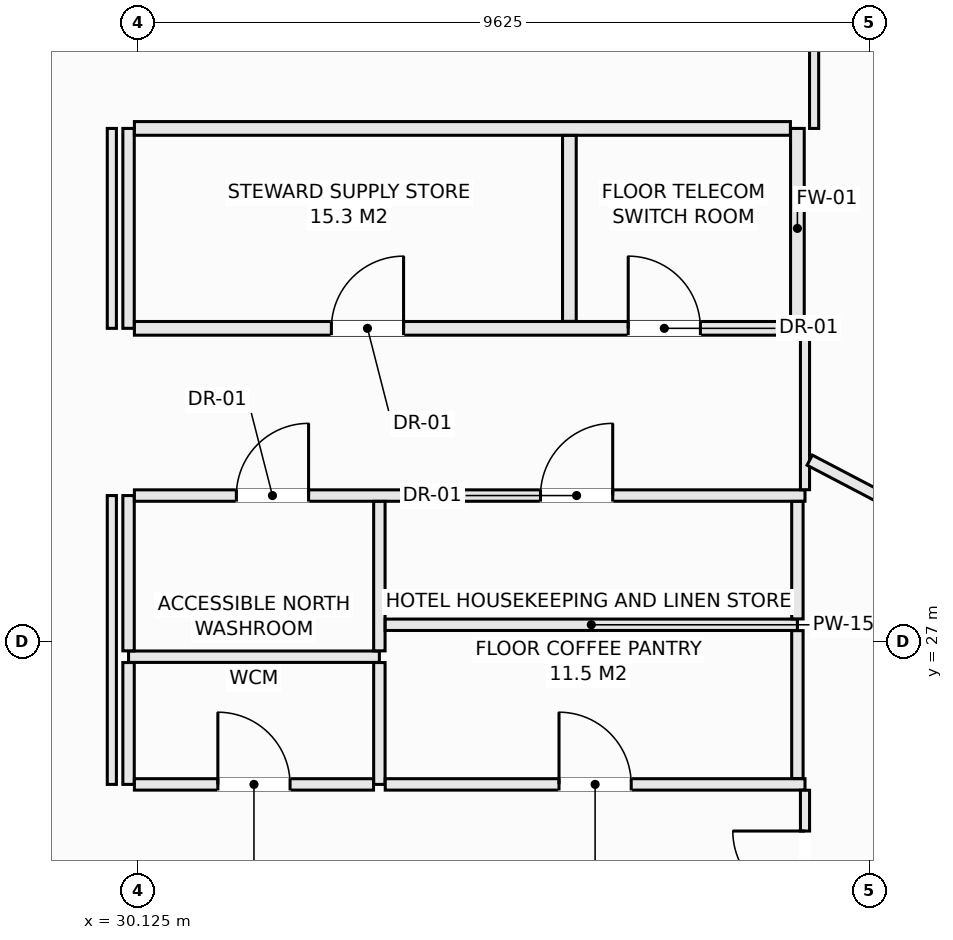
"""IFC4 building model, lengths in metres.
Left out: names, types, materials, properties, quantities, classifications, styles, units other than length and angle.
Written with IfcOpenShell. Run it as: python <this file> out.ifc"""

import sys

from ifc_helpers import new_model, si_unit, direction, frame, frame_2d, origin, place, context, subcontext, project, spatial, rectangle, extrude, element, fill, save


model = new_model("IFC4")
c1 = context("Model", 3, precision=1e-05, world=origin(), true_north=direction((0.0, 1.0)))
c2 = subcontext(c1, "Body", "Model", "MODEL_VIEW")
j1 = project(units=[si_unit("LENGTHUNIT", "METRE"), si_unit("PLANEANGLEUNIT", "RADIAN")], contexts=[c1])
p1 = place(None, origin())
s1 = spatial("IfcSite", under=j1, at=p1, CompositionType="ELEMENT")
p2 = place(p1, origin())
s2 = spatial("IfcBuilding", under=s1, at=p2, CompositionType="ELEMENT")
p3 = place(p2, frame((0.0, 0.0, 159.7)))
s3 = spatial("IfcBuildingStorey", under=s2, at=p3, CompositionType="ELEMENT", Elevation=159.7)
p4 = place(p3, frame((30.0, 26.8, 0.0), z_axis=(0.0, 0.0, 1.0), x_axis=(1.0, 0.0, 0.0)))
e1 = element("IfcWall", 1, at=p4, inside=s3, PredefinedType="PARTITIONING", context=c2, shape_type="SweptSolid", body=[
    extrude(rectangle(XDim=3.3, YDim=0.15, at=frame_2d((1.65, 0.0))), origin(), (0.0, 0.0, 1.0), 3.13),
])
p5 = place(p3, frame((30.0, 25.12, 0.0), z_axis=(0.0, 0.0, 1.0), x_axis=(0.0, 1.0, 0.0)))
e2 = element("IfcWall", 2, at=p5, inside=s3, PredefinedType="PARTITIONING", context=c2, shape_type="SweptSolid", body=[
    extrude(rectangle(XDim=1.603, YDim=0.15, at=frame_2d((0.801, 0.0))), origin(), (0.0, 0.0, 1.0), 3.13),
])
p6 = place(p3, frame((30.0, 26.877, 0.0), z_axis=(0.0, 0.0, 1.0), x_axis=(0.0, 1.0, 0.0)))
e3 = element("IfcWall", 3, at=p6, inside=s3, PredefinedType="PARTITIONING", context=c2, shape_type="SweptSolid", body=[
    extrude(rectangle(XDim=2.043, YDim=0.15, at=frame_2d((1.021, 0.0))), origin(), (0.0, 0.0, 1.0), 3.13),
])
p7 = place(p3, frame((30.0, 31.12, 0.0), z_axis=(0.0, 0.0, 1.0), x_axis=(0.0, 1.0, 0.0)))
e4 = element("IfcWall", 4, at=p7, inside=s3, PredefinedType="PARTITIONING", context=c2, shape_type="SweptSolid", body=[
    extrude(rectangle(XDim=2.63, YDim=0.15, at=frame_2d((1.315, 0.0))), origin(), (0.0, 0.0, 1.0), 3.13),
])
p8 = place(p3, frame((30.077, 28.92, 0.0), z_axis=(0.0, 0.0, 1.0), x_axis=(1.0, 0.0, 0.0)))
e5 = element("IfcWall", 5, at=p8, inside=s3, PredefinedType="PARTITIONING", context=c2, shape_type="SweptSolid", body=[
    extrude(rectangle(XDim=8.823, YDim=0.15, at=frame_2d((4.412, 0.0))), origin(), (0.0, 0.0, 1.0), 3.13),
])
p9 = place(p8, frame((1.342, 0.0, 0.0)))
e6 = element("IfcOpeningElement", 6, at=p9, cuts=e5, PredefinedType="OPENING", context=c2, shape_type="SweptSolid", body=[
    extrude(rectangle(XDim=0.95, YDim=2.1, at=frame_2d((0.475, 1.05))), frame((0.0, 0.085, 0.0), z_axis=(0.0, -1.0, 0.0), x_axis=(1.0, 0.0, 0.0)), (0.0, 0.0, 1.0), 0.17),
])
p10 = place(p8, frame((5.343, 0.0, 0.0)))
e7 = element("IfcOpeningElement", 7, at=p10, cuts=e5, PredefinedType="OPENING", context=c2, shape_type="SweptSolid", body=[
    extrude(rectangle(XDim=0.95, YDim=2.1, at=frame_2d((0.475, 1.05))), frame((0.0, 0.085, 0.0), z_axis=(0.0, -1.0, 0.0), x_axis=(1.0, 0.0, 0.0)), (0.0, 0.0, 1.0), 0.17),
])
p11 = place(p3, frame((33.3, 25.12, 0.0), z_axis=(0.0, 0.0, 1.0), x_axis=(0.0, 1.0, 0.0)))
e8 = element("IfcWall", 8, at=p11, inside=s3, PredefinedType="PARTITIONING", context=c2, shape_type="SweptSolid", body=[
    extrude(rectangle(XDim=1.603, YDim=0.15, at=frame_2d((0.801, 0.0))), origin(), (0.0, 0.0, 1.0), 3.13),
])
p12 = place(p3, frame((33.3, 26.877, 0.0), z_axis=(0.0, 0.0, 1.0), x_axis=(0.0, 1.0, 0.0)))
e9 = element("IfcWall", 9, at=p12, inside=s3, PredefinedType="PARTITIONING", context=c2, shape_type="SweptSolid", body=[
    extrude(rectangle(XDim=1.966, YDim=0.15, at=frame_2d((0.983, 0.0))), origin(), (0.0, 0.0, 1.0), 3.13),
])
p13 = place(p3, frame((30.077, 25.12, 0.0), z_axis=(0.0, 0.0, 1.0), x_axis=(1.0, 0.0, 0.0)))
e10 = element("IfcWall", 10, at=p13, inside=s3, PredefinedType="PARTITIONING", context=c2, shape_type="SweptSolid", body=[
    extrude(rectangle(XDim=3.146, YDim=0.15, at=frame_2d((1.573, 0.0))), origin(), (0.0, 0.0, 1.0), 3.13),
])
p14 = place(p13, frame((1.098, 0.0, 0.0)))
e11 = element("IfcOpeningElement", 11, at=p14, cuts=e10, PredefinedType="OPENING", context=c2, shape_type="SweptSolid", body=[
    extrude(rectangle(XDim=0.95, YDim=2.1, at=frame_2d((0.475, 1.05))), frame((0.0, 0.085, 0.0), z_axis=(0.0, -1.0, 0.0), x_axis=(1.0, 0.0, 0.0)), (0.0, 0.0, 1.0), 0.17),
])
p15 = place(p3, frame((33.377, 25.12, 0.0), z_axis=(0.0, 0.0, 1.0), x_axis=(1.0, 0.0, 0.0)))
e12 = element("IfcWall", 12, at=p15, inside=s3, PredefinedType="PARTITIONING", context=c2, shape_type="SweptSolid", body=[
    extrude(rectangle(XDim=5.523, YDim=0.15, at=frame_2d((2.761, 0.0))), origin(), (0.0, 0.0, 1.0), 3.13),
])
p16 = place(p15, frame((2.287, 0.0, 0.0)))
e13 = element("IfcOpeningElement", 13, at=p16, cuts=e12, PredefinedType="OPENING", context=c2, shape_type="SweptSolid", body=[
    extrude(rectangle(XDim=0.95, YDim=2.1, at=frame_2d((0.475, 1.05))), frame((0.0, 0.085, 0.0), z_axis=(0.0, -1.0, 0.0), x_axis=(1.0, 0.0, 0.0)), (0.0, 0.0, 1.0), 0.17),
])
p17 = place(p3, frame((33.377, 27.22, 0.0), z_axis=(0.0, 0.0, 1.0), x_axis=(1.0, 0.0, 0.0)))
e14 = element("IfcWall", 14, at=p17, inside=s3, PredefinedType="PARTITIONING", context=c2, shape_type="SweptSolid", body=[
    extrude(rectangle(XDim=5.423, YDim=0.15, at=frame_2d((2.711, 0.0))), origin(), (0.0, 0.0, 1.0), 3.13),
])
p18 = place(p3, frame((38.8, 25.197, 0.0), z_axis=(0.0, 0.0, 1.0), x_axis=(0.0, 1.0, 0.0)))
e15 = element("IfcWall", 15, at=p18, inside=s3, PredefinedType="PARTITIONING", context=c2, shape_type="SweptSolid", body=[
    extrude(rectangle(XDim=1.946, YDim=0.15, at=frame_2d((0.973, 0.0))), origin(), (0.0, 0.0, 1.0), 3.13),
])
p19 = place(p3, frame((38.8, 27.297, 0.0), z_axis=(0.0, 0.0, 1.0), x_axis=(0.0, 1.0, 0.0)))
e16 = element("IfcWall", 16, at=p19, inside=s3, PredefinedType="PARTITIONING", context=c2, shape_type="SweptSolid", body=[
    extrude(rectangle(XDim=1.546, YDim=0.15, at=frame_2d((0.773, 0.0))), origin(), (0.0, 0.0, 1.0), 3.13),
])
p20 = place(p3, frame((38.8, 31.12, 0.0), z_axis=(0.0, 0.0, 1.0), x_axis=(0.0, 1.0, 0.0)))
e17 = element("IfcWall", 17, at=p20, inside=s3, PredefinedType="SOLIDWALL", context=c2, shape_type="SweptSolid", body=[
    extrude(rectangle(XDim=2.63, YDim=0.18, at=frame_2d((1.315, 0.0))), origin(), (0.0, 0.0, 1.0), 3.13),
])
p21 = place(p3, frame((30.077, 31.12, 0.0), z_axis=(0.0, 0.0, 1.0), x_axis=(1.0, 0.0, 0.0)))
e18 = element("IfcWall", 18, at=p21, inside=s3, PredefinedType="SOLIDWALL", context=c2, shape_type="SweptSolid", body=[
    extrude(rectangle(XDim=8.631, YDim=0.18, at=frame_2d((4.315, 0.0))), origin(), (0.0, 0.0, 1.0), 3.13),
])
p22 = place(p21, frame((2.592, 0.0, 0.0)))
e19 = element("IfcOpeningElement", 19, at=p22, cuts=e18, PredefinedType="OPENING", context=c2, shape_type="SweptSolid", body=[
    extrude(rectangle(XDim=0.95, YDim=2.1, at=frame_2d((0.475, 1.05))), frame((0.0, 0.1, 0.0), z_axis=(0.0, -1.0, 0.0), x_axis=(1.0, 0.0, 0.0)), (0.0, 0.0, 1.0), 0.2),
])
p23 = place(p21, frame((6.497, 0.0, 0.0)))
e20 = element("IfcOpeningElement", 20, at=p23, cuts=e18, PredefinedType="OPENING", context=c2, shape_type="SweptSolid", body=[
    extrude(rectangle(XDim=0.95, YDim=2.1, at=frame_2d((0.475, 1.05))), frame((0.0, 0.1, 0.0), z_axis=(0.0, -1.0, 0.0), x_axis=(1.0, 0.0, 0.0)), (0.0, 0.0, 1.0), 0.2),
])
p24 = place(p3, frame((30.077, 33.75, 0.0), z_axis=(0.0, 0.0, 1.0), x_axis=(1.0, 0.0, 0.0)))
e21 = element("IfcWall", 21, at=p24, inside=s3, PredefinedType="SOLIDWALL", context=c2, shape_type="SweptSolid", body=[
    extrude(rectangle(XDim=8.631, YDim=0.18, at=frame_2d((4.315, 0.0))), origin(), (0.0, 0.0, 1.0), 3.13),
])
p25 = place(p3, frame((35.8, 31.212, 0.0), z_axis=(0.0, 0.0, 1.0), x_axis=(0.0, 1.0, 0.0)))
e22 = element("IfcWall", 22, at=p25, inside=s3, PredefinedType="SOLIDWALL", context=c2, shape_type="SweptSolid", body=[
    extrude(rectangle(XDim=2.446, YDim=0.18, at=frame_2d((1.223, 0.0))), origin(), (0.0, 0.0, 1.0), 3.13),
])
p26 = place(p3, frame((39.02, 33.75, 0.0), z_axis=(0.0, 0.0, 1.0), x_axis=(0.0, 1.0, 0.0)))
e23 = element("IfcWall", 23, at=p26, inside=s3, PredefinedType="PARTITIONING", context=c2, shape_type="SweptSolid", body=[
    extrude(rectangle(XDim=2.0, YDim=0.12, at=frame_2d((1.0, 0.0))), origin(), (0.0, 0.0, 1.0), 3.13),
])
p27 = place(p3, frame((29.78, 25.12, 0.0), z_axis=(0.0, 0.0, 1.0), x_axis=(0.0, 1.0, 0.0)))
e24 = element("IfcWall", 24, at=p27, inside=s3, PredefinedType="PARTITIONING", context=c2, shape_type="SweptSolid", body=[
    extrude(rectangle(XDim=3.8, YDim=0.12, at=frame_2d((1.9, 0.0))), origin(), (0.0, 0.0, 1.0), 3.13),
])
p28 = place(p3, frame((29.78, 31.12, 0.0), z_axis=(0.0, 0.0, 1.0), x_axis=(0.0, 1.0, 0.0)))
e25 = element("IfcWall", 25, at=p28, inside=s3, PredefinedType="PARTITIONING", context=c2, shape_type="SweptSolid", body=[
    extrude(rectangle(XDim=2.63, YDim=0.12, at=frame_2d((1.315, 0.0))), origin(), (0.0, 0.0, 1.0), 3.13),
])
p29 = place(p3, frame((38.9, 23.02, 0.0), z_axis=(0.0, 0.0, 1.0), x_axis=(0.0, 1.0, 0.0)))
e26 = element("IfcWall", 26, at=p29, inside=s3, PredefinedType="PARTITIONING", context=c2, shape_type="SweptSolid", body=[
    extrude(rectangle(XDim=2.023, YDim=0.12, at=frame_2d((1.011, 0.0))), origin(), (0.0, 0.0, 1.0), 3.13),
])
p30 = place(p29, frame((0.537, 0.0, 0.0)))
e27 = element("IfcOpeningElement", 27, at=p30, cuts=e26, PredefinedType="OPENING", context=c2, shape_type="SweptSolid", body=[
    extrude(rectangle(XDim=0.95, YDim=2.1, at=frame_2d((0.475, 1.05))), frame((0.0, 0.07, 0.0), z_axis=(0.0, -1.0, 0.0), x_axis=(1.0, 0.0, 0.0)), (0.0, 0.0, 1.0), 0.14),
])
p31 = place(p3, frame((38.9, 28.997, 0.0), z_axis=(0.0, 0.0, 1.0), x_axis=(0.0, 1.0, 0.0)))
e28 = element("IfcWall", 28, at=p31, inside=s3, PredefinedType="PARTITIONING", context=c2, shape_type="SweptSolid", body=[
    extrude(rectangle(XDim=2.123, YDim=0.12, at=frame_2d((1.062, 0.0))), origin(), (0.0, 0.0, 1.0), 3.13),
])
p32 = place(p3, frame((38.962, 29.386, 0.0), z_axis=(0.0, 0.0, 1.0), x_axis=(0.885905291329, -0.463866160434, 0.0)))
e29 = element("IfcWall", 29, at=p32, inside=s3, PredefinedType="PARTITIONING", context=c2, shape_type="SweptSolid", body=[
    extrude(rectangle(XDim=13.863, YDim=0.15, at=frame_2d((6.931, 0.0))), origin(), (0.0, 0.0, 1.0), 2.505),
])
p33 = place(p3, frame((39.021, 19.324, 0.0), z_axis=(0.0, 0.0, 1.0), x_axis=(0.724517158733, 0.689256763986, 0.0)))
e30 = element("IfcWall", 30, at=p33, inside=s3, PredefinedType="PARTITIONING", context=c2, shape_type="SweptSolid", body=[
    extrude(rectangle(XDim=9.306, YDim=0.12, at=frame_2d((4.653, 0.0))), origin(), (0.0, 0.0, 1.0), 2.505),
])
p34 = place(p9, origin())
e31 = element("IfcDoor", 31, at=p34, inside=s3, OperationType="SINGLE_SWING_RIGHT", PredefinedType="DOOR", context=c2, shape_type="SweptSolid", body=[
    extrude(rectangle(XDim=0.95, YDim=2.1, at=frame_2d((0.475, 1.05))), frame((0.0, 0.025, 0.0), z_axis=(0.0, -1.0, 0.0), x_axis=(1.0, 0.0, 0.0)), (0.0, 0.0, 1.0), 0.05),
])
fill(e6, e31)
p35 = place(p14, origin())
e32 = element("IfcDoor", 32, at=p35, inside=s3, OperationType="SINGLE_SWING_LEFT", PredefinedType="DOOR", context=c2, shape_type="SweptSolid", body=[
    extrude(rectangle(XDim=0.95, YDim=2.1, at=frame_2d((0.475, 1.05))), frame((0.0, 0.025, 0.0), z_axis=(0.0, -1.0, 0.0), x_axis=(1.0, 0.0, 0.0)), (0.0, 0.0, 1.0), 0.05),
])
fill(e11, e32)
p36 = place(p10, origin())
e33 = element("IfcDoor", 33, at=p36, inside=s3, OperationType="SINGLE_SWING_RIGHT", PredefinedType="DOOR", context=c2, shape_type="SweptSolid", body=[
    extrude(rectangle(XDim=0.95, YDim=2.1, at=frame_2d((0.475, 1.05))), frame((0.0, 0.025, 0.0), z_axis=(0.0, -1.0, 0.0), x_axis=(1.0, 0.0, 0.0)), (0.0, 0.0, 1.0), 0.05),
])
fill(e7, e33)
p37 = place(p16, origin())
e34 = element("IfcDoor", 34, at=p37, inside=s3, OperationType="SINGLE_SWING_LEFT", PredefinedType="DOOR", context=c2, shape_type="SweptSolid", body=[
    extrude(rectangle(XDim=0.95, YDim=2.1, at=frame_2d((0.475, 1.05))), frame((0.0, 0.025, 0.0), z_axis=(0.0, -1.0, 0.0), x_axis=(1.0, 0.0, 0.0)), (0.0, 0.0, 1.0), 0.05),
])
fill(e13, e34)
p38 = place(p22, origin())
e35 = element("IfcDoor", 35, at=p38, inside=s3, OperationType="SINGLE_SWING_RIGHT", PredefinedType="DOOR", context=c2, shape_type="SweptSolid", body=[
    extrude(rectangle(XDim=0.95, YDim=2.1, at=frame_2d((0.475, 1.05))), frame((0.0, 0.025, 0.0), z_axis=(0.0, -1.0, 0.0), x_axis=(1.0, 0.0, 0.0)), (0.0, 0.0, 1.0), 0.05),
])
fill(e19, e35)
p39 = place(p23, origin())
e36 = element("IfcDoor", 36, at=p39, inside=s3, OperationType="SINGLE_SWING_LEFT", PredefinedType="DOOR", context=c2, shape_type="SweptSolid", body=[
    extrude(rectangle(XDim=0.95, YDim=2.1, at=frame_2d((0.475, 1.05))), frame((0.0, 0.025, 0.0), z_axis=(0.0, -1.0, 0.0), x_axis=(1.0, 0.0, 0.0)), (0.0, 0.0, 1.0), 0.05),
])
fill(e20, e36)
p40 = place(p30, origin())
e37 = element("IfcDoor", 37, at=p40, inside=s3, OperationType="SINGLE_SWING_RIGHT", PredefinedType="DOOR", context=c2, shape_type="SweptSolid", body=[
    extrude(rectangle(XDim=0.95, YDim=2.1, at=frame_2d((0.475, 1.05))), frame((0.0, 0.025, 0.0), z_axis=(0.0, -1.0, 0.0), x_axis=(1.0, 0.0, 0.0)), (0.0, 0.0, 1.0), 0.05),
])
fill(e27, e37)
save(model, sys.argv[1])
